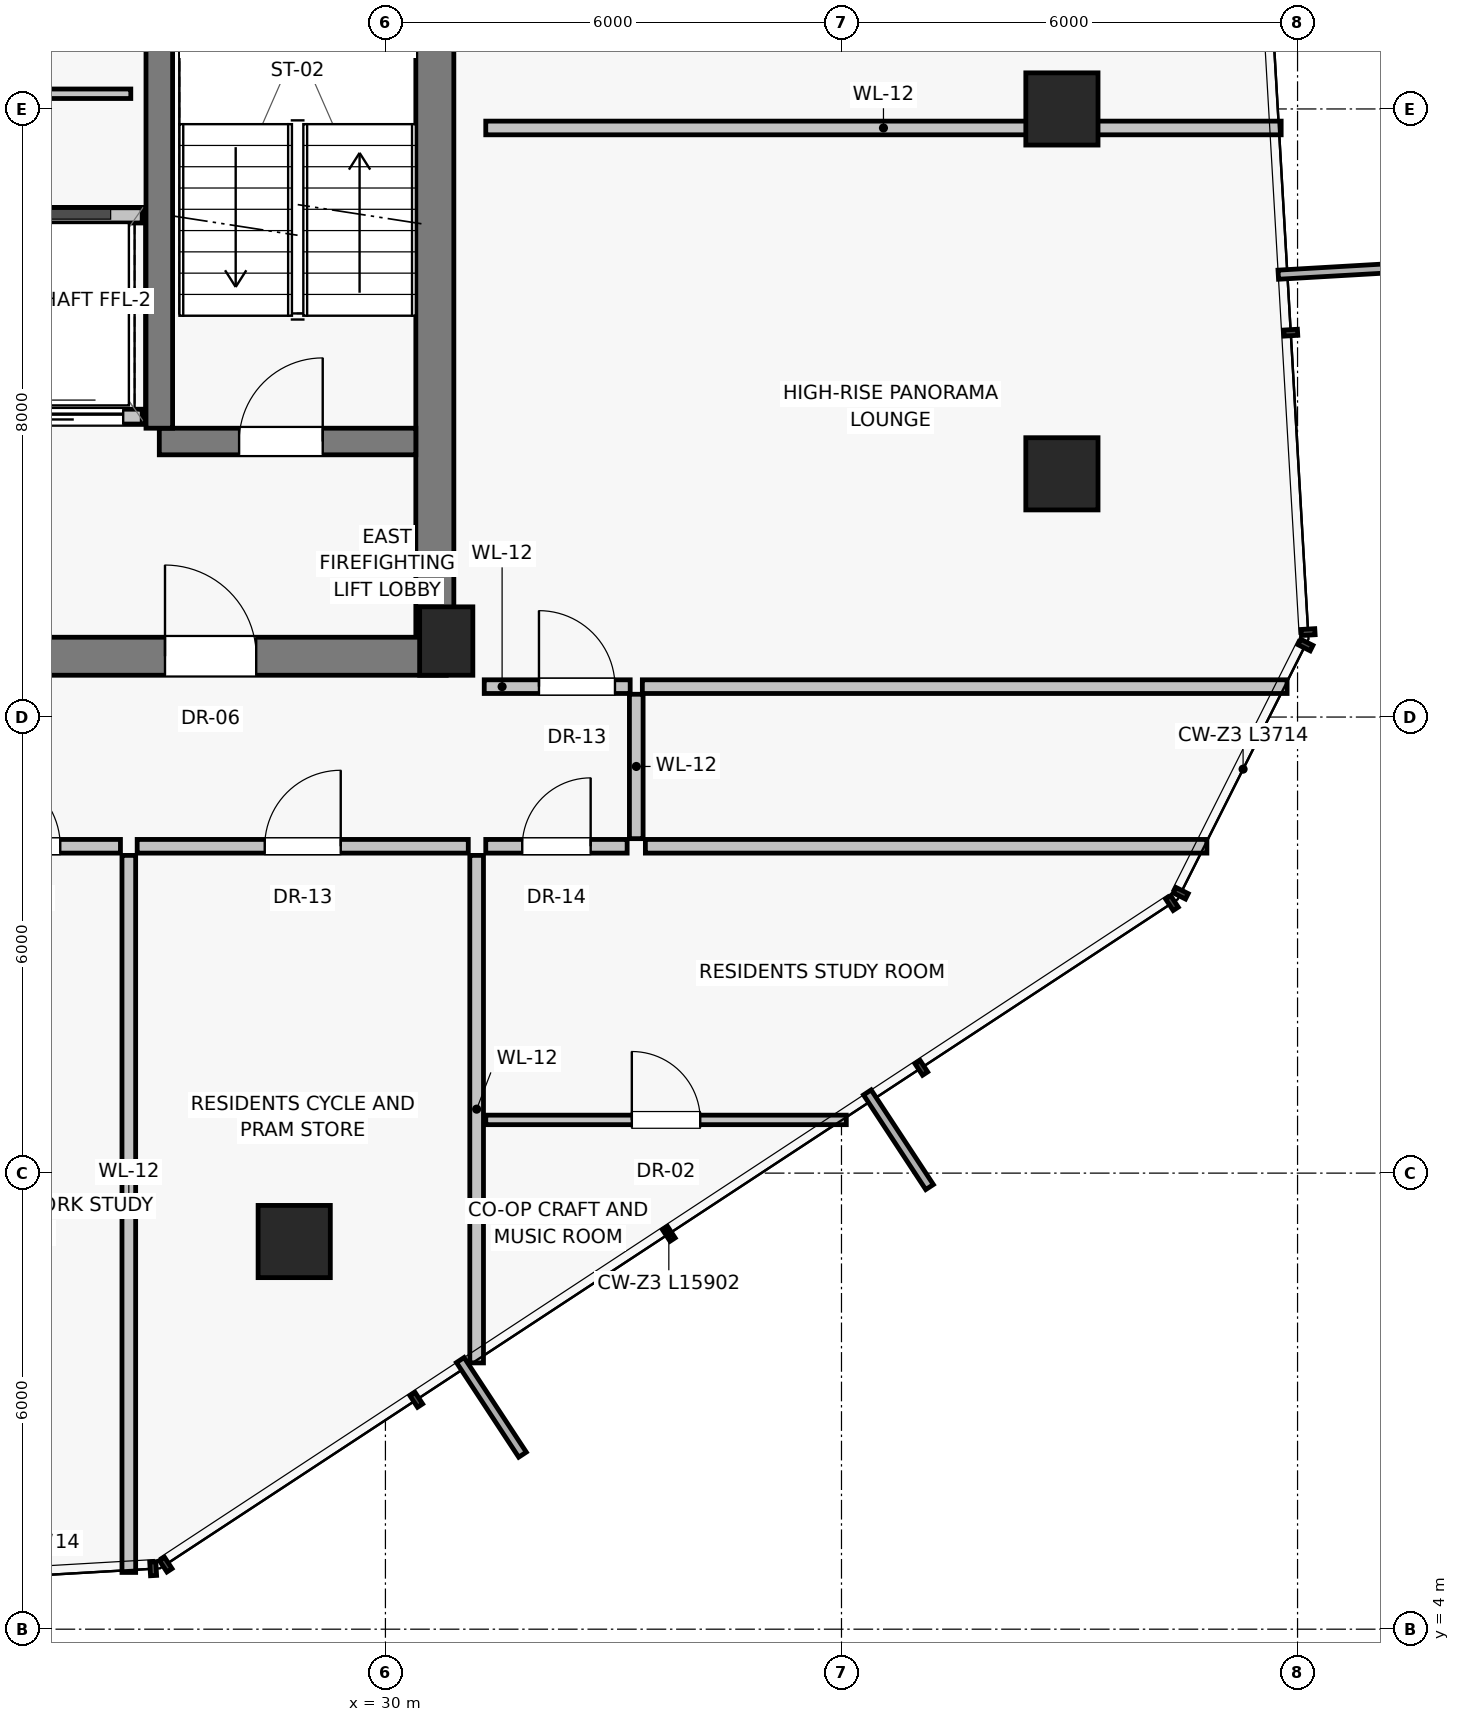
"""IFC4 building model, lengths in metres.
Left out: names, types, materials, properties, quantities, classifications, styles, units other than length and angle.
Written with IfcOpenShell. Run it as: python <this file> out.ifc"""

import sys

from ifc_helpers import new_model, si_unit, direction, frame, frame_2d, origin, origin_2d, place, context, subcontext, project, spatial, rectangle, extrude, source, transform, mapped, element, fill, save


model = new_model("IFC4")
c1 = context("Model", 3, precision=1e-05, world=origin(), true_north=direction((0.0, 1.0)))
c2 = subcontext(c1, "Body", "Model", "MODEL_VIEW")
j1 = project(units=[si_unit("LENGTHUNIT", "METRE"), si_unit("PLANEANGLEUNIT", "RADIAN")], contexts=[c1])
p1 = place(None, origin())
s1 = spatial("IfcSite", under=j1, at=p1, CompositionType="ELEMENT")
p2 = place(p1, origin())
s2 = spatial("IfcBuilding", under=s1, at=p2, CompositionType="ELEMENT")
p3 = place(p2, frame((0.0, 0.0, 195.1)))
s3 = spatial("IfcBuildingStorey", under=s2, at=p3, CompositionType="ELEMENT", Elevation=195.1)
p4 = place(p3, frame((30.8, 17.0, 0.0), z_axis=(0.0, 0.0, 1.0), x_axis=(1.0, 0.0, 0.0)))
e1 = element("IfcColumn", 1, at=p4, inside=s3, PredefinedType="PILASTER", context=c2, shape_type="SweptSolid", body=[
    extrude(rectangle(XDim=0.7, YDim=0.9, at=origin_2d()), origin(), (0.0, 0.0, 1.0), 3.25),
])
for number, where, z_axis, x_axis in (
    (2, (38.9, 19.2, 0.0), (0.0, 0.0, 1.0), (1.0, 0.0, 0.0)),
    (3, (38.9, 24.0, 0.0), (0.0, 0.0, 1.0), (1.0, 0.0, 0.0)),
    (4, (28.8, 9.1, 0.0), (0.0, 0.0, 1.0), (1.0, 0.0, 0.0)),
):
    element("IfcColumn", number, at=place(p3, frame(where, z_axis=z_axis, x_axis=x_axis)), inside=s3, PredefinedType="COLUMN", context=c2, shape_type="SweptSolid", body=[
        extrude(rectangle(XDim=0.95, YDim=0.95, at=origin_2d()), origin(), (0.0, 0.0, 1.0), 3.25),
    ])
p5 = place(p3, frame((30.65, 16.8, 0.0), z_axis=(0.0, 0.0, 1.0), x_axis=(0.0, 1.0, 0.0)))
e5 = element("IfcWall", 5, at=p5, inside=s3, PredefinedType="SHEAR", context=c2, shape_type="SweptSolid", body=[
    extrude(rectangle(XDim=14.2, YDim=0.5, at=frame_2d((7.1, 0.0))), origin(), (0.0, 0.0, 1.0), 3.015),
])
p6 = place(p3, frame((24.95, 16.8, 0.0), z_axis=(0.0, 0.0, 1.0), x_axis=(1.0, 0.0, 0.0)))
e6 = element("IfcWall", 6, at=p6, inside=s3, PredefinedType="SHEAR", context=c2, shape_type="SweptSolid", body=[
    extrude(rectangle(XDim=5.85, YDim=0.5, at=frame_2d((2.925, 0.0))), origin(), (0.0, 0.0, 1.0), 3.015),
])
p7 = place(p6, frame((2.15, 0.0, 0.0)))
e7 = element("IfcOpeningElement", 7, at=p7, cuts=e6, PredefinedType="OPENING", context=c2, shape_type="SweptSolid", body=[
    extrude(rectangle(XDim=1.2, YDim=2.03, at=frame_2d((0.6, 1.015))), frame((0.0, 0.26, 0.0), z_axis=(0.0, -1.0, 0.0), x_axis=(1.0, 0.0, 0.0)), (0.0, 0.0, 1.0), 0.52),
])
p8 = place(p3, frame((24.95, 19.95, 0.0), z_axis=(0.0, 0.0, 1.0), x_axis=(1.0, 0.0, 0.0)))
e8 = element("IfcWall", 8, at=p8, inside=s3, PredefinedType="SOLIDWALL", context=c2, shape_type="SweptSolid", body=[
    extrude(rectangle(XDim=1.85, YDim=0.2, at=frame_2d((0.925, 0.0))), origin(), (0.0, 0.0, 1.0), 3.015),
])
p9 = place(p8, frame((0.3, 0.0, 0.0)))
e9 = element("IfcOpeningElement", 9, at=p9, cuts=e8, PredefinedType="OPENING", context=c2, shape_type="SweptSolid", body=[
    extrude(rectangle(XDim=1.3, YDim=2.25, at=frame_2d((0.65, 1.125))), frame((0.0, 0.11, 0.0), z_axis=(0.0, -1.0, 0.0), x_axis=(1.0, 0.0, 0.0)), (0.0, 0.0, 1.0), 0.22),
])
p10 = place(p3, frame((27.025, 19.625, 0.0), z_axis=(0.0, 0.0, 1.0), x_axis=(1.0, 0.0, 0.0)))
e10 = element("IfcWall", 10, at=p10, inside=s3, PredefinedType="SHEAR", context=c2, shape_type="SweptSolid", body=[
    extrude(rectangle(XDim=3.375, YDim=0.35, at=frame_2d((1.688, 0.0))), origin(), (0.0, 0.0, 1.0), 3.015),
])
p11 = place(p10, frame((1.05, 0.0, 0.0)))
e11 = element("IfcOpeningElement", 11, at=p11, cuts=e10, PredefinedType="OPENING", context=c2, shape_type="SweptSolid", body=[
    extrude(rectangle(XDim=1.1, YDim=2.03, at=frame_2d((0.55, 1.015))), frame((0.0, 0.185, 0.0), z_axis=(0.0, -1.0, 0.0), x_axis=(1.0, 0.0, 0.0)), (0.0, 0.0, 1.0), 0.37),
])
p12 = place(p3, frame((27.025, 19.8, 0.0), z_axis=(0.0, 0.0, 1.0), x_axis=(0.0, 1.0, 0.0)))
e12 = element("IfcWall", 12, at=p12, inside=s3, PredefinedType="SHEAR", context=c2, shape_type="SweptSolid", body=[
    extrude(rectangle(XDim=8.775, YDim=0.35, at=frame_2d((4.387, 0.0))), origin(), (0.0, 0.0, 1.0), 3.015),
])
p13 = place(p3, frame((24.95, 22.6, 0.0), z_axis=(0.0, 0.0, 1.0), x_axis=(1.0, 0.0, 0.0)))
e13 = element("IfcWall", 13, at=p13, inside=s3, PredefinedType="SOLIDWALL", context=c2, shape_type="SweptSolid", body=[
    extrude(rectangle(XDim=1.85, YDim=0.2, at=frame_2d((0.925, 0.0))), origin(), (0.0, 0.0, 1.0), 3.015),
])
p14 = place(p3, frame((24.1, 24.2, 0.0), z_axis=(0.0, 0.0, 1.0), x_axis=(1.0, 0.0, 0.0)))
e14 = element("IfcWall", 14, at=p14, inside=s3, PredefinedType="PARTITIONING", context=c2, shape_type="SweptSolid", body=[
    extrude(rectangle(XDim=2.55, YDim=0.125, at=frame_2d((1.275, 0.0))), origin(), (0.0, 0.0, 1.0), 3.015),
])
p15 = place(p3, frame((31.2, 14.18, 0.0), z_axis=(0.0, 0.0, 1.0), x_axis=(0.0, -1.0, 0.0)))
e15 = element("IfcWall", 15, at=p15, inside=s3, PredefinedType="PARTITIONING", context=c2, shape_type="SweptSolid", body=[
    extrude(rectangle(XDim=6.677, YDim=0.18, at=frame_2d((3.338, 0.0))), origin(), (0.0, 0.0, 1.0), 3.015),
])
p16 = place(p3, frame((23.93, 14.3, 0.0), z_axis=(0.0, 0.0, 1.0), x_axis=(1.0, 0.0, 0.0)))
e16 = element("IfcWall", 16, at=p16, inside=s3, PredefinedType="PARTITIONING", context=c2, shape_type="SweptSolid", body=[
    extrude(rectangle(XDim=2.584, YDim=0.18, at=frame_2d((1.292, 0.0))), origin(), (0.0, 0.0, 1.0), 3.015),
])
p17 = place(p16, frame((0.792, 0.0, 0.0)))
e17 = element("IfcOpeningElement", 17, at=p17, cuts=e16, PredefinedType="OPENING", context=c2, shape_type="SweptSolid", body=[
    extrude(rectangle(XDim=1.0, YDim=2.01, at=frame_2d((0.5, 1.005))), frame((0.0, 0.1, 0.0), z_axis=(0.0, -1.0, 0.0), x_axis=(1.0, 0.0, 0.0)), (0.0, 0.0, 1.0), 0.2),
])
p18 = place(p3, frame((26.734, 14.3, 0.0), z_axis=(0.0, 0.0, 1.0), x_axis=(1.0, 0.0, 0.0)))
e18 = element("IfcWall", 18, at=p18, inside=s3, PredefinedType="PARTITIONING", context=c2, shape_type="SweptSolid", body=[
    extrude(rectangle(XDim=4.356, YDim=0.18, at=frame_2d((2.178, 0.0))), origin(), (0.0, 0.0, 1.0), 3.015),
])
p19 = place(p18, frame((1.678, 0.0, 0.0)))
e19 = element("IfcOpeningElement", 19, at=p19, cuts=e18, PredefinedType="OPENING", context=c2, shape_type="SweptSolid", body=[
    extrude(rectangle(XDim=1.0, YDim=2.01, at=frame_2d((0.5, 1.005))), frame((0.0, 0.1, 0.0), z_axis=(0.0, -1.0, 0.0), x_axis=(1.0, 0.0, 0.0)), (0.0, 0.0, 1.0), 0.2),
])
p20 = place(p3, frame((26.624, 14.18, 0.0), z_axis=(0.0, 0.0, 1.0), x_axis=(0.0, -1.0, 0.0)))
e20 = element("IfcWall", 20, at=p20, inside=s3, PredefinedType="PARTITIONING", context=c2, shape_type="SweptSolid", body=[
    extrude(rectangle(XDim=9.433, YDim=0.18, at=frame_2d((4.717, 0.0))), origin(), (0.0, 0.0, 1.0), 3.015),
])
p21 = place(p3, frame((31.32, 23.75, 0.0), z_axis=(0.0, 0.0, 1.0), x_axis=(1.0, 0.0, 0.0)))
e21 = element("IfcWall", 21, at=p21, inside=s3, PredefinedType="PARTITIONING", context=c2, shape_type="SweptSolid", body=[
    extrude(rectangle(XDim=10.464, YDim=0.18, at=frame_2d((5.232, 0.0))), origin(), (0.0, 0.0, 1.0), 3.015),
])
p22 = place(p3, frame((33.3, 14.4, 0.0), z_axis=(0.0, 0.0, 1.0), x_axis=(0.0, 1.0, 0.0)))
e22 = element("IfcWall", 22, at=p22, inside=s3, PredefinedType="PARTITIONING", context=c2, shape_type="SweptSolid", body=[
    extrude(rectangle(XDim=1.9, YDim=0.18, at=frame_2d((0.95, 0.0))), origin(), (0.0, 0.0, 1.0), 3.015),
])
p23 = place(p3, frame((31.3, 16.4, 0.0), z_axis=(0.0, 0.0, 1.0), x_axis=(1.0, 0.0, 0.0)))
e23 = element("IfcWall", 23, at=p23, inside=s3, PredefinedType="PARTITIONING", context=c2, shape_type="SweptSolid", body=[
    extrude(rectangle(XDim=1.92, YDim=0.18, at=frame_2d((0.96, 0.0))), origin(), (0.0, 0.0, 1.0), 3.015),
])
p24 = place(p23, frame((0.72, 0.0, 0.0)))
e24 = element("IfcOpeningElement", 24, at=p24, cuts=e23, PredefinedType="OPENING", context=c2, shape_type="SweptSolid", body=[
    extrude(rectangle(XDim=1.0, YDim=2.01, at=frame_2d((0.5, 1.005))), frame((0.0, 0.1, 0.0), z_axis=(0.0, -1.0, 0.0), x_axis=(1.0, 0.0, 0.0)), (0.0, 0.0, 1.0), 0.2),
])
p25 = place(p3, frame((33.38, 16.4, 0.0), z_axis=(0.0, 0.0, 1.0), x_axis=(1.0, 0.0, 0.0)))
e25 = element("IfcWall", 25, at=p25, inside=s3, PredefinedType="PARTITIONING", context=c2, shape_type="SweptSolid", body=[
    extrude(rectangle(XDim=8.483, YDim=0.18, at=frame_2d((4.241, 0.0))), origin(), (0.0, 0.0, 1.0), 3.015),
])
p26 = place(p3, frame((33.42, 14.3, 0.0), z_axis=(0.0, 0.0, 1.0), x_axis=(1.0, 0.0, 0.0)))
e26 = element("IfcWall", 26, at=p26, inside=s3, PredefinedType="PARTITIONING", context=c2, shape_type="SweptSolid", body=[
    extrude(rectangle(XDim=7.387, YDim=0.18, at=frame_2d((3.694, 0.0))), origin(), (0.0, 0.0, 1.0), 3.015),
])
p27 = place(p3, frame((31.32, 14.3, 0.0), z_axis=(0.0, 0.0, 1.0), x_axis=(1.0, 0.0, 0.0)))
e27 = element("IfcWall", 27, at=p27, inside=s3, PredefinedType="PARTITIONING", context=c2, shape_type="SweptSolid", body=[
    extrude(rectangle(XDim=1.86, YDim=0.18, at=frame_2d((0.93, 0.0))), origin(), (0.0, 0.0, 1.0), 3.015),
])
p28 = place(p27, frame((0.48, 0.0, 0.0)))
e28 = element("IfcOpeningElement", 28, at=p28, cuts=e27, PredefinedType="OPENING", context=c2, shape_type="SweptSolid", body=[
    extrude(rectangle(XDim=0.9, YDim=2.01, at=frame_2d((0.45, 1.005))), frame((0.0, 0.1, 0.0), z_axis=(0.0, -1.0, 0.0), x_axis=(1.0, 0.0, 0.0)), (0.0, 0.0, 1.0), 0.2),
])
p29 = place(p3, frame((31.32, 10.7, 0.0), z_axis=(0.0, 0.0, 1.0), x_axis=(1.0, 0.0, 0.0)))
e29 = element("IfcWall", 29, at=p29, inside=s3, PredefinedType="PARTITIONING", context=c2, shape_type="SweptSolid", body=[
    extrude(rectangle(XDim=4.743, YDim=0.125, at=frame_2d((2.372, 0.0))), origin(), (0.0, 0.0, 1.0), 3.015),
])
p30 = place(p29, frame((1.922, 0.0, 0.0)))
e30 = element("IfcOpeningElement", 30, at=p30, cuts=e29, PredefinedType="OPENING", context=c2, shape_type="SweptSolid", body=[
    extrude(rectangle(XDim=0.9, YDim=2.01, at=frame_2d((0.45, 1.005))), frame((0.0, 0.073, 0.0), z_axis=(0.0, -1.0, 0.0), x_axis=(1.0, 0.0, 0.0)), (0.0, 0.0, 1.0), 0.145),
])
m1 = source(origin(), c2, "Body", "SweptSolid", [
    extrude(rectangle(XDim=1.2, YDim=2.03, at=frame_2d((0.6, 1.015))), frame((0.0, 0.025, 0.0), z_axis=(0.0, -1.0, 0.0), x_axis=(1.0, 0.0, 0.0)), (0.0, 0.0, 1.0), 0.05),
])
p31 = place(p7, origin())
e31 = element("IfcDoor", 31, at=p31, inside=s3, OperationType="SINGLE_SWING_LEFT", PredefinedType="DOOR", context=c2, shape_type="MappedRepresentation", body=[
    mapped(m1, transform((0.0, 0.0, 0.0), scale=1.0)),
])
fill(e7, e31)
m2 = source(origin(), c2, "Body", "SweptSolid", [
    extrude(rectangle(XDim=1.3, YDim=2.25, at=frame_2d((0.65, 1.125))), frame((0.0, 0.025, 0.0), z_axis=(0.0, -1.0, 0.0), x_axis=(1.0, 0.0, 0.0)), (0.0, 0.0, 1.0), 0.05),
])
p32 = place(p9, origin())
e32 = element("IfcDoor", 32, at=p32, inside=s3, OperationType="SLIDING_TO_LEFT", PredefinedType="DOOR", context=c2, shape_type="MappedRepresentation", body=[
    mapped(m2, transform((0.0, 0.0, 0.0), scale=1.0)),
])
fill(e9, e32)
m3 = source(origin(), c2, "Body", "SweptSolid", [
    extrude(rectangle(XDim=1.1, YDim=2.03, at=frame_2d((0.55, 1.015))), frame((0.0, 0.025, 0.0), z_axis=(0.0, -1.0, 0.0), x_axis=(1.0, 0.0, 0.0)), (0.0, 0.0, 1.0), 0.05),
])
p33 = place(p11, origin())
e33 = element("IfcDoor", 33, at=p33, inside=s3, OperationType="SINGLE_SWING_RIGHT", PredefinedType="DOOR", context=c2, shape_type="MappedRepresentation", body=[
    mapped(m3, transform((0.0, 0.0, 0.0), scale=1.0)),
])
fill(e11, e33)
m4 = source(origin(), c2, "Body", "SweptSolid", [
    extrude(rectangle(XDim=1.0, YDim=2.01, at=frame_2d((0.5, 1.005))), frame((0.0, 0.025, 0.0), z_axis=(0.0, -1.0, 0.0), x_axis=(1.0, 0.0, 0.0)), (0.0, 0.0, 1.0), 0.05),
])
p34 = place(p17, origin())
e34 = element("IfcDoor", 34, at=p34, inside=s3, OperationType="SINGLE_SWING_LEFT", PredefinedType="DOOR", context=c2, shape_type="MappedRepresentation", body=[
    mapped(m4, transform((0.0, 0.0, 0.0), scale=1.0)),
])
fill(e17, e34)
p35 = place(p19, origin())
e35 = element("IfcDoor", 35, at=p35, inside=s3, OperationType="SINGLE_SWING_RIGHT", PredefinedType="DOOR", context=c2, shape_type="MappedRepresentation", body=[
    mapped(m4, transform((0.0, 0.0, 0.0), scale=1.0)),
])
fill(e19, e35)
p36 = place(p24, origin())
e36 = element("IfcDoor", 36, at=p36, inside=s3, OperationType="SINGLE_SWING_LEFT", PredefinedType="DOOR", context=c2, shape_type="MappedRepresentation", body=[
    mapped(m4, transform((0.0, 0.0, 0.0), scale=1.0)),
])
fill(e24, e36)
m5 = source(origin(), c2, "Body", "SweptSolid", [
    extrude(rectangle(XDim=0.9, YDim=2.01, at=frame_2d((0.45, 1.005))), frame((0.0, 0.025, 0.0), z_axis=(0.0, -1.0, 0.0), x_axis=(1.0, 0.0, 0.0)), (0.0, 0.0, 1.0), 0.05),
])
p37 = place(p28, origin())
e37 = element("IfcDoor", 37, at=p37, inside=s3, OperationType="SINGLE_SWING_RIGHT", PredefinedType="DOOR", context=c2, shape_type="MappedRepresentation", body=[
    mapped(m5, transform((0.0, 0.0, 0.0), scale=1.0)),
])
fill(e28, e37)
p38 = place(p30, origin())
e38 = element("IfcDoor", 38, at=p38, inside=s3, OperationType="SINGLE_SWING_LEFT", PredefinedType="DOOR", context=c2, shape_type="MappedRepresentation", body=[
    mapped(m5, transform((0.0, 0.0, 0.0), scale=1.0)),
])
fill(e30, e38)
save(model, sys.argv[1])
